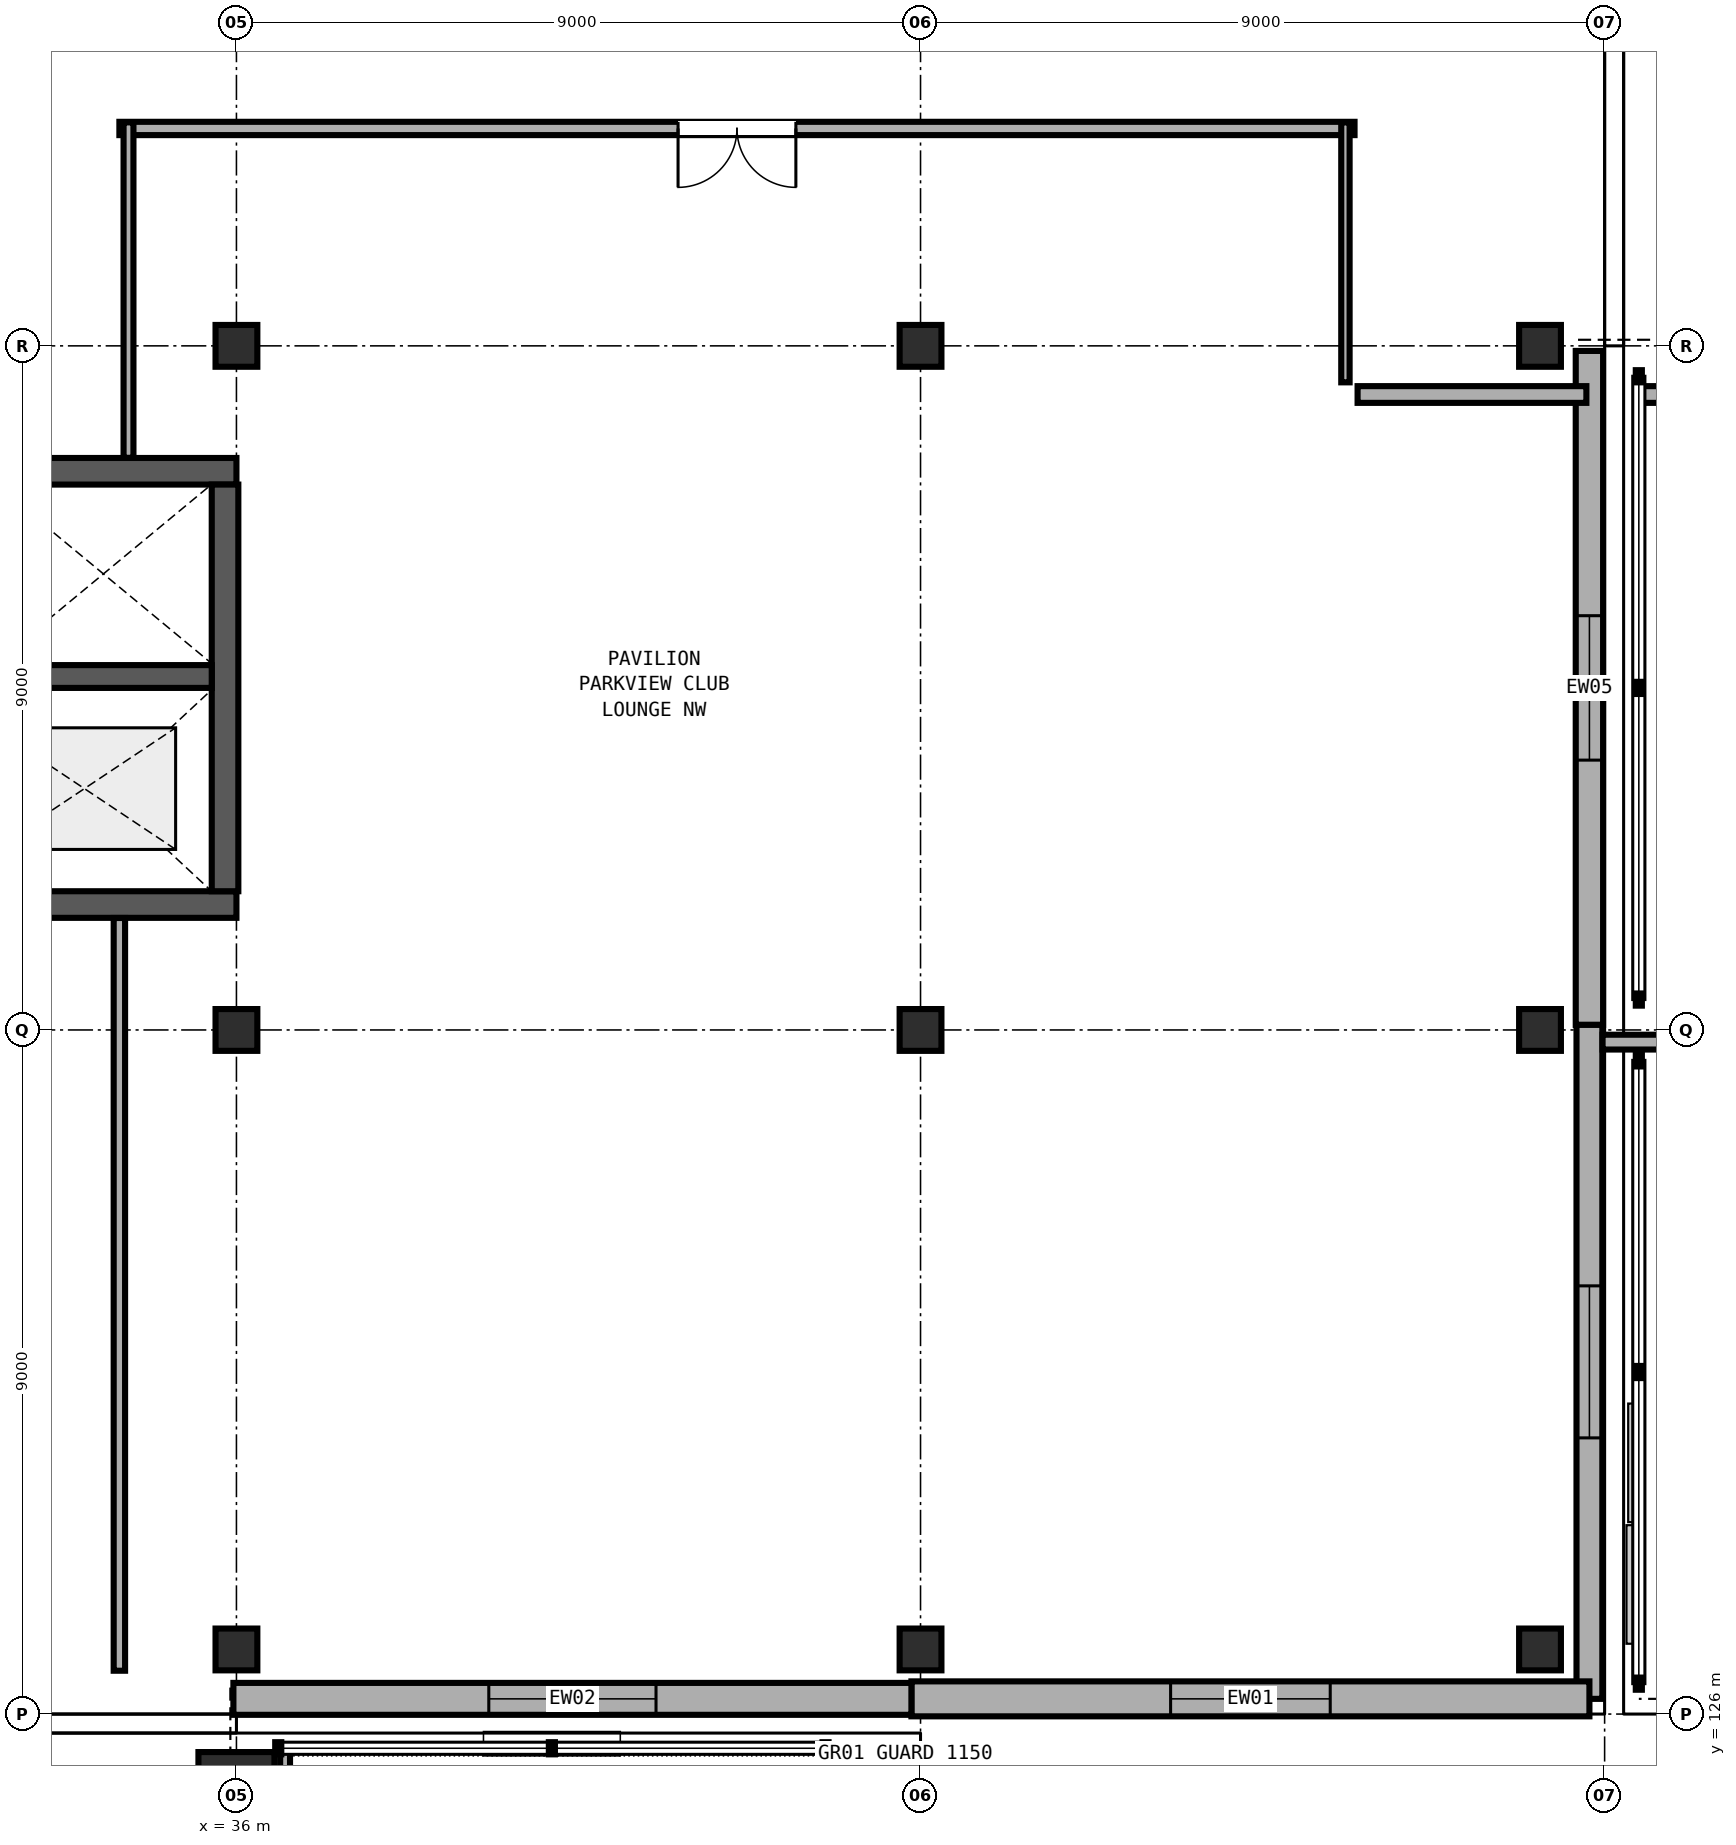
"""IFC4 building model, lengths in metres.
Left out: names, types, materials, properties, quantities, classifications, styles, units other than length and angle.
Written with IfcOpenShell. Run it as: python <this file> out.ifc"""

import sys

from ifc_helpers import new_model, si_unit, direction, frame, frame_2d, origin, origin_2d, place, context, subcontext, project, spatial, rectangle, extrude, element, fill, save


model = new_model("IFC4")
c1 = context("Model", 3, precision=1e-05, world=origin(), true_north=direction((0.0, 1.0)))
c2 = subcontext(c1, "Body", "Model", "MODEL_VIEW")
j1 = project(units=[si_unit("LENGTHUNIT", "METRE"), si_unit("PLANEANGLEUNIT", "RADIAN")], contexts=[c1])
p1 = place(None, origin())
s1 = spatial("IfcSite", under=j1, at=p1, CompositionType="ELEMENT")
p2 = place(p1, origin())
s2 = spatial("IfcBuilding", under=s1, at=p2, CompositionType="ELEMENT")
p3 = place(p2, frame((0.0, 0.0, 9.6)))
s3 = spatial("IfcBuildingStorey", under=s2, at=p3, CompositionType="ELEMENT", Elevation=9.6)
p4 = place(p3, frame((36.0, 124.9, 0.0), z_axis=(0.0, 0.0, 1.0), x_axis=(1.0, 0.0, 0.0)))
e1 = element("IfcColumn", 1, at=p4, inside=s3, PredefinedType="COLUMN", context=c2, shape_type="SweptSolid", body=[
    extrude(rectangle(XDim=1.0, YDim=1.2, at=origin_2d()), origin(), (0.0, 0.0, 1.0), 4.8),
])
p5 = place(p3, frame((44.3, 124.9, 0.0), z_axis=(0.0, 0.0, 1.0), x_axis=(1.0, 0.0, 0.0)))
e2 = element("IfcColumn", 2, at=p5, inside=s3, PredefinedType="COLUMN", context=c2, shape_type="SweptSolid", body=[
    extrude(rectangle(XDim=1.0, YDim=1.0, at=origin_2d()), origin(), (0.0, 0.0, 1.0), 4.8),
])
for number, where, z_axis, x_axis in (
    (3, (36.0, 126.85, 0.0), (0.0, 0.0, 1.0), (1.0, 0.0, 0.0)),
    (4, (36.0, 135.0, 0.0), (0.0, 0.0, 1.0), (1.0, 0.0, 0.0)),
    (5, (36.0, 144.0, 0.0), (0.0, 0.0, 1.0), (1.0, 0.0, 0.0)),
    (6, (45.0, 126.85, 0.0), (0.0, 0.0, 1.0), (1.0, 0.0, 0.0)),
    (7, (45.0, 135.0, 0.0), (0.0, 0.0, 1.0), (1.0, 0.0, 0.0)),
    (8, (45.0, 144.0, 0.0), (0.0, 0.0, 1.0), (1.0, 0.0, 0.0)),
    (9, (53.15, 126.85, 0.0), (0.0, 0.0, 1.0), (1.0, 0.0, 0.0)),
    (10, (53.15, 135.0, 0.0), (0.0, 0.0, 1.0), (1.0, 0.0, 0.0)),
    (11, (53.15, 144.0, 0.0), (0.0, 0.0, 1.0), (1.0, 0.0, 0.0)),
):
    element("IfcColumn", number, at=place(p3, frame(where, z_axis=z_axis, x_axis=x_axis)), inside=s3, PredefinedType="COLUMN", context=c2, shape_type="SweptSolid", body=[
        extrude(rectangle(XDim=0.55, YDim=0.55, at=origin_2d()), origin(), (0.0, 0.0, 1.0), 4.8),
    ])
p6 = place(p3, frame((18.0, 136.65, 0.0), z_axis=(0.0, 0.0, 1.0), x_axis=(1.0, 0.0, 0.0)))
e12 = element("IfcWall", 12, at=p6, inside=s3, PredefinedType="SHEAR", context=c2, shape_type="SweptSolid", body=[
    extrude(rectangle(XDim=18.0, YDim=0.35, at=frame_2d((9.0, 0.0))), origin(), (0.0, 0.0, 1.0), 4.555),
])
p7 = place(p3, frame((36.0, 142.35, 0.0), z_axis=(0.0, 0.0, 1.0), x_axis=(-1.0, 0.0, 0.0)))
e13 = element("IfcWall", 13, at=p7, inside=s3, PredefinedType="SHEAR", context=c2, shape_type="SweptSolid", body=[
    extrude(rectangle(XDim=18.0, YDim=0.35, at=frame_2d((9.0, 0.0))), origin(), (0.0, 0.0, 1.0), 4.555),
])
p8 = place(p7, frame((4.7, 0.0, 0.0)))
e14 = element("IfcOpeningElement", 14, at=p8, cuts=e13, PredefinedType="OPENING", context=c2, shape_type="SweptSolid", body=[
    extrude(rectangle(XDim=1.9, YDim=2.25, at=frame_2d((0.95, 1.125))), frame((0.0, 0.185, 0.0), z_axis=(0.0, -1.0, 0.0), x_axis=(1.0, 0.0, 0.0)), (0.0, 0.0, 1.0), 0.37),
])
p9 = place(p3, frame((35.85, 136.825, 0.0), z_axis=(0.0, 0.0, 1.0), x_axis=(0.0, 1.0, 0.0)))
e15 = element("IfcWall", 15, at=p9, inside=s3, PredefinedType="SHEAR", context=c2, shape_type="SweptSolid", body=[
    extrude(rectangle(XDim=5.35, YDim=0.35, at=frame_2d((2.675, 0.0))), origin(), (0.0, 0.0, 1.0), 4.555),
])
p10 = place(p3, frame((32.8, 139.65, 0.0), z_axis=(0.0, 0.0, 1.0), x_axis=(1.0, 0.0, 0.0)))
e16 = element("IfcWall", 16, at=p10, inside=s3, PredefinedType="SHEAR", context=c2, shape_type="SweptSolid", body=[
    extrude(rectangle(XDim=2.875, YDim=0.3, at=frame_2d((1.438, 0.0))), origin(), (0.0, 0.0, 1.0), 4.555),
])
p11 = place(p3, frame((53.8, 143.933, 0.0), z_axis=(0.0, 0.0, 1.0), x_axis=(0.0, -1.0, 0.0)))
e17 = element("IfcWall", 17, at=p11, inside=s3, PredefinedType="SOLIDWALL", context=c2, shape_type="SweptSolid", body=[
    extrude(rectangle(XDim=8.867, YDim=0.36, at=frame_2d((4.433, 0.0))), origin(), (0.0, 0.0, 1.0), 3.58),
])
p12 = place(p11, frame((3.483, 0.0, 0.9)))
e18 = element("IfcOpeningElement", 18, at=p12, cuts=e17, PredefinedType="OPENING", context=c2, shape_type="SweptSolid", body=[
    extrude(rectangle(XDim=1.9, YDim=1.8, at=frame_2d((0.95, 0.9))), frame((0.0, 0.19, 0.0), z_axis=(0.0, -1.0, 0.0), x_axis=(1.0, 0.0, 0.0)), (0.0, 0.0, 1.0), 0.38),
])
p13 = place(p3, frame((53.8, 135.067, 0.0), z_axis=(0.0, 0.0, 1.0), x_axis=(0.0, -1.0, 0.0)))
e19 = element("IfcWall", 19, at=p13, inside=s3, PredefinedType="SOLIDWALL", context=c2, shape_type="SweptSolid", body=[
    extrude(rectangle(XDim=8.867, YDim=0.34, at=frame_2d((4.433, 0.0))), origin(), (0.0, 0.0, 1.0), 3.58),
])
p14 = place(p13, frame((3.433, 0.0, 0.9)))
e20 = element("IfcOpeningElement", 20, at=p14, cuts=e19, PredefinedType="OPENING", context=c2, shape_type="SweptSolid", body=[
    extrude(rectangle(XDim=2.0, YDim=1.85, at=frame_2d((1.0, 0.925))), frame((0.0, 0.18, 0.0), z_axis=(0.0, -1.0, 0.0), x_axis=(1.0, 0.0, 0.0)), (0.0, 0.0, 1.0), 0.36),
])
p15 = place(p3, frame((53.8, 126.2, 0.0), z_axis=(0.0, 0.0, 1.0), x_axis=(-1.0, 0.0, 0.0)))
e21 = element("IfcWall", 21, at=p15, inside=s3, PredefinedType="SOLIDWALL", context=c2, shape_type="SweptSolid", body=[
    extrude(rectangle(XDim=8.92, YDim=0.46, at=frame_2d((4.46, 0.0))), origin(), (0.0, 0.0, 1.0), 3.58),
])
p16 = place(p15, frame((3.41, 0.0, 0.9)))
e22 = element("IfcOpeningElement", 22, at=p16, cuts=e21, PredefinedType="OPENING", context=c2, shape_type="SweptSolid", body=[
    extrude(rectangle(XDim=2.1, YDim=1.9, at=frame_2d((1.05, 0.95))), frame((0.0, 0.24, 0.0), z_axis=(0.0, -1.0, 0.0), x_axis=(1.0, 0.0, 0.0)), (0.0, 0.0, 1.0), 0.48),
])
p17 = place(p3, frame((44.88, 126.2, 0.0), z_axis=(0.0, 0.0, 1.0), x_axis=(-1.0, 0.0, 0.0)))
e23 = element("IfcWall", 23, at=p17, inside=s3, PredefinedType="SOLIDWALL", context=c2, shape_type="SweptSolid", body=[
    extrude(rectangle(XDim=8.92, YDim=0.42, at=frame_2d((4.46, 0.0))), origin(), (0.0, 0.0, 1.0), 3.58),
])
p18 = place(p17, frame((3.36, 0.0, 0.9)))
e24 = element("IfcOpeningElement", 24, at=p18, cuts=e23, PredefinedType="OPENING", context=c2, shape_type="SweptSolid", body=[
    extrude(rectangle(XDim=2.2, YDim=1.95, at=frame_2d((1.1, 0.975))), frame((0.0, 0.22, 0.0), z_axis=(0.0, -1.0, 0.0), x_axis=(1.0, 0.0, 0.0)), (0.0, 0.0, 1.0), 0.44),
])
p19 = place(p3, frame((36.64, 122.5, 0.0), z_axis=(0.0, 0.0, 1.0), x_axis=(0.0, 1.0, 0.0)))
e25 = element("IfcWall", 25, at=p19, inside=s3, PredefinedType="PARTITIONING", context=c2, shape_type="SweptSolid", body=[
    extrude(rectangle(XDim=3.01, YDim=0.13, at=frame_2d((1.505, 0.0))), origin(), (0.0, 0.0, 1.0), 3.56),
])
p20 = place(p3, frame((54.483, 143.36, 0.0), z_axis=(0.0, 0.0, 1.0), x_axis=(1.0, 0.0, 0.0)))
e26 = element("IfcWall", 26, at=p20, inside=s3, PredefinedType="PARTITIONING", context=c2, shape_type="SweptSolid", body=[
    extrude(rectangle(XDim=2.757, YDim=0.22, at=frame_2d((1.378, 0.0))), origin(), (0.0, 0.0, 1.0), 3.56),
])
p21 = place(p3, frame((57.24, 134.84, 0.0), z_axis=(0.0, 0.0, 1.0), x_axis=(-1.0, 0.0, 0.0)))
e27 = element("IfcWall", 27, at=p21, inside=s3, PredefinedType="PARTITIONING", context=c2, shape_type="SweptSolid", body=[
    extrude(rectangle(XDim=3.267, YDim=0.195, at=frame_2d((1.634, 0.0))), origin(), (0.0, 0.0, 1.0), 3.56),
])
p22 = place(p3, frame((50.71, 146.86, 0.0), z_axis=(0.0, 0.0, 1.0), x_axis=(-1.0, 0.0, 0.0)))
e28 = element("IfcWall", 28, at=p22, inside=s3, PredefinedType="PARTITIONING", context=c2, shape_type="SweptSolid", body=[
    extrude(rectangle(XDim=16.25, YDim=0.175, at=frame_2d((8.125, 0.0))), origin(), (0.0, 0.0, 1.0), 3.56),
])
p23 = place(p22, frame((7.35, 0.0, 0.0)))
e29 = element("IfcOpeningElement", 29, at=p23, cuts=e28, PredefinedType="OPENING", context=c2, shape_type="SweptSolid", body=[
    extrude(rectangle(XDim=1.55, YDim=2.2, at=frame_2d((0.775, 1.1))), frame((0.0, 0.097, 0.0), z_axis=(0.0, -1.0, 0.0), x_axis=(1.0, 0.0, 0.0)), (0.0, 0.0, 1.0), 0.195),
])
p24 = place(p3, frame((34.46, 126.57, 0.0), z_axis=(0.0, 0.0, 1.0), x_axis=(0.0, 1.0, 0.0)))
e30 = element("IfcWall", 30, at=p24, inside=s3, PredefinedType="PARTITIONING", context=c2, shape_type="SweptSolid", body=[
    extrude(rectangle(XDim=9.903, YDim=0.15, at=frame_2d((4.951, 0.0))), origin(), (0.0, 0.0, 1.0), 3.56),
])
p25 = place(p3, frame((34.58, 142.527, 0.0), z_axis=(0.0, 0.0, 1.0), x_axis=(0.0, 1.0, 0.0)))
e31 = element("IfcWall", 31, at=p25, inside=s3, PredefinedType="PARTITIONING", context=c2, shape_type="SweptSolid", body=[
    extrude(rectangle(XDim=4.413, YDim=0.13, at=frame_2d((2.207, 0.0))), origin(), (0.0, 0.0, 1.0), 3.56),
])
p26 = place(p3, frame((50.59, 146.94, 0.0), z_axis=(0.0, 0.0, 1.0), x_axis=(0.0, -1.0, 0.0)))
e32 = element("IfcWall", 32, at=p26, inside=s3, PredefinedType="PARTITIONING", context=c2, shape_type="SweptSolid", body=[
    extrude(rectangle(XDim=3.42, YDim=0.11, at=frame_2d((1.71, 0.0))), origin(), (0.0, 0.0, 1.0), 3.56),
])
p27 = place(p3, frame((50.75, 143.36, 0.0), z_axis=(0.0, 0.0, 1.0), x_axis=(1.0, 0.0, 0.0)))
e33 = element("IfcWall", 33, at=p27, inside=s3, PredefinedType="PARTITIONING", context=c2, shape_type="SweptSolid", body=[
    extrude(rectangle(XDim=3.01, YDim=0.22, at=frame_2d((1.505, 0.0))), origin(), (0.0, 0.0, 1.0), 3.56),
])
p28 = place(p12, origin())
e34 = element("IfcWindow", 34, at=p28, inside=s3, PartitioningType="DOUBLE_PANEL_VERTICAL", PredefinedType="WINDOW", context=c2, shape_type="SweptSolid", body=[
    extrude(rectangle(XDim=1.9, YDim=1.8, at=frame_2d((0.95, 0.9))), frame((0.0, 0.03, 0.0), z_axis=(0.0, -1.0, 0.0), x_axis=(1.0, 0.0, 0.0)), (0.0, 0.0, 1.0), 0.06),
])
fill(e18, e34)
p29 = place(p14, origin())
e35 = element("IfcWindow", 35, at=p29, inside=s3, PartitioningType="DOUBLE_PANEL_VERTICAL", PredefinedType="WINDOW", context=c2, shape_type="SweptSolid", body=[
    extrude(rectangle(XDim=2.0, YDim=1.85, at=frame_2d((1.0, 0.925))), frame((0.0, 0.03, 0.0), z_axis=(0.0, -1.0, 0.0), x_axis=(1.0, 0.0, 0.0)), (0.0, 0.0, 1.0), 0.06),
])
fill(e20, e35)
p30 = place(p16, origin())
e36 = element("IfcWindow", 36, at=p30, inside=s3, PartitioningType="DOUBLE_PANEL_VERTICAL", PredefinedType="WINDOW", context=c2, shape_type="SweptSolid", body=[
    extrude(rectangle(XDim=2.1, YDim=1.9, at=frame_2d((1.05, 0.95))), frame((0.0, 0.03, 0.0), z_axis=(0.0, -1.0, 0.0), x_axis=(1.0, 0.0, 0.0)), (0.0, 0.0, 1.0), 0.06),
])
fill(e22, e36)
p31 = place(p18, origin())
e37 = element("IfcWindow", 37, at=p31, inside=s3, PartitioningType="DOUBLE_PANEL_VERTICAL", PredefinedType="WINDOW", context=c2, shape_type="SweptSolid", body=[
    extrude(rectangle(XDim=2.2, YDim=1.95, at=frame_2d((1.1, 0.975))), frame((0.0, 0.03, 0.0), z_axis=(0.0, -1.0, 0.0), x_axis=(1.0, 0.0, 0.0)), (0.0, 0.0, 1.0), 0.06),
])
fill(e24, e37)
p32 = place(p23, origin())
e38 = element("IfcDoor", 38, at=p32, inside=s3, OperationType="DOUBLE_DOOR_SINGLE_SWING", PredefinedType="DOOR", context=c2, shape_type="SweptSolid", body=[
    extrude(rectangle(XDim=1.55, YDim=2.2, at=frame_2d((0.775, 1.1))), frame((0.0, 0.025, 0.0), z_axis=(0.0, -1.0, 0.0), x_axis=(1.0, 0.0, 0.0)), (0.0, 0.0, 1.0), 0.05),
])
fill(e29, e38)
save(model, sys.argv[1])
